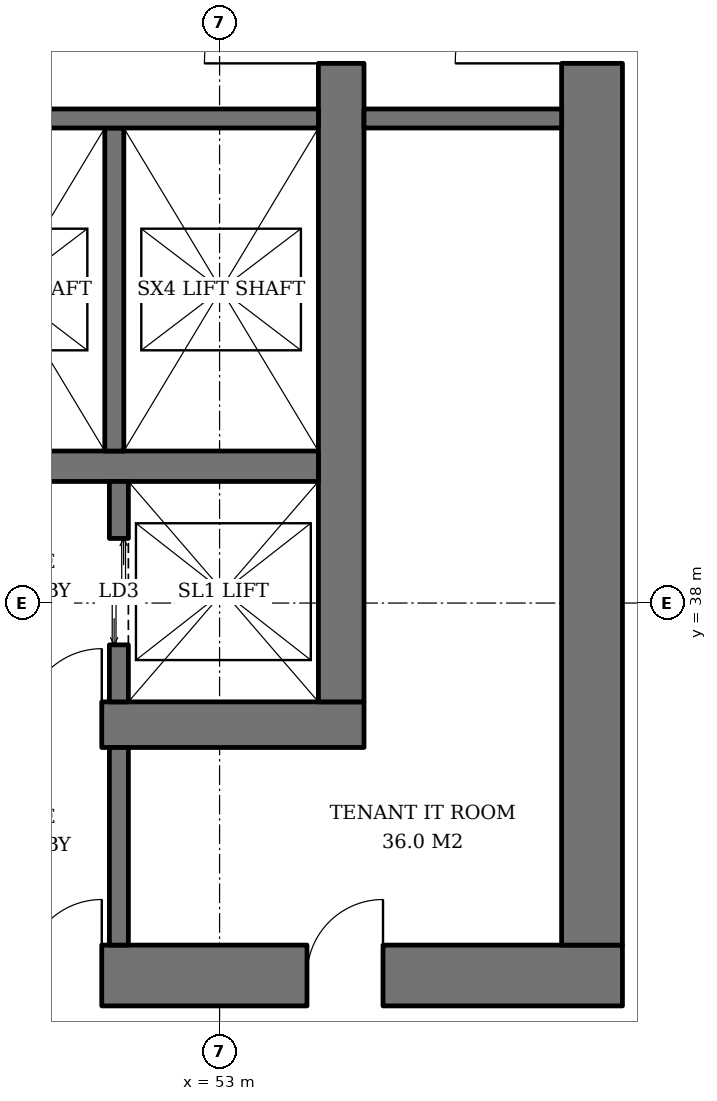
"""IFC4 building model, lengths in metres.
Left out: names, types, materials, properties, quantities, classifications, styles, units other than length and angle.
Written with IfcOpenShell. Run it as: python <this file> out.ifc"""

import sys

from ifc_helpers import new_model, si_unit, direction, frame, frame_2d, origin, place, context, subcontext, project, spatial, rectangle, extrude, element, fill, save


model = new_model("IFC4")
c1 = context("Model", 3, precision=1e-05, world=origin(), true_north=direction((0.0, 1.0)))
c2 = subcontext(c1, "Body", "Model", "MODEL_VIEW")
j1 = project(units=[si_unit("LENGTHUNIT", "METRE"), si_unit("PLANEANGLEUNIT", "RADIAN")], contexts=[c1])
p1 = place(None, origin())
s1 = spatial("IfcSite", under=j1, at=p1, CompositionType="ELEMENT")
p2 = place(p1, origin())
s2 = spatial("IfcBuilding", under=s1, at=p2, CompositionType="ELEMENT")
p3 = place(p2, frame((0.0, 0.0, 28.6)))
s3 = spatial("IfcBuildingStorey", under=s2, at=p3, CompositionType="ELEMENT", Elevation=28.6)
p4 = place(p3, frame((35.1, 36.4, 0.0), z_axis=(0.0, 0.0, 1.0), x_axis=(1.0, 0.0, 0.0)))
e1 = element("IfcWall", 1, at=p4, inside=s3, PredefinedType="SHEAR", context=c2, shape_type="SweptSolid", body=[
    extrude(rectangle(XDim=19.8, YDim=0.6, at=frame_2d((9.9, 0.0))), origin(), (0.0, 0.0, 1.0), 3.8),
])
p5 = place(p4, frame((3.9, 0.0, 0.0)))
e2 = element("IfcOpeningElement", 2, at=p5, cuts=e1, PredefinedType="OPENING", context=c2, shape_type="SweptSolid", body=[
    extrude(rectangle(XDim=1.0, YDim=2.1, at=frame_2d((0.5, 1.05))), frame((0.0, 0.31, 0.0), z_axis=(0.0, -1.0, 0.0), x_axis=(1.0, 0.0, 0.0)), (0.0, 0.0, 1.0), 0.62),
])
p6 = place(p4, frame((15.35, 0.0, 0.0)))
e3 = element("IfcOpeningElement", 3, at=p6, cuts=e1, PredefinedType="OPENING", context=c2, shape_type="SweptSolid", body=[
    extrude(rectangle(XDim=1.0, YDim=2.1, at=frame_2d((0.5, 1.05))), frame((0.0, 0.31, 0.0), z_axis=(0.0, -1.0, 0.0), x_axis=(1.0, 0.0, 0.0)), (0.0, 0.0, 1.0), 0.62),
])
p7 = place(p3, frame((54.6, 36.7, 0.0), z_axis=(0.0, 0.0, 1.0), x_axis=(0.0, 1.0, 0.0)))
e4 = element("IfcWall", 4, at=p7, inside=s3, PredefinedType="SHEAR", context=c2, shape_type="SweptSolid", body=[
    extrude(rectangle(XDim=18.6, YDim=0.6, at=frame_2d((9.3, 0.0))), origin(), (0.0, 0.0, 1.0), 3.8),
])
p8 = place(p7, frame((8.4, 0.0, 0.0)))
e5 = element("IfcOpeningElement", 5, at=p8, cuts=e4, PredefinedType="OPENING", context=c2, shape_type="SweptSolid", body=[
    extrude(rectangle(XDim=1.8, YDim=2.4, at=frame_2d((0.9, 1.2))), frame((0.0, 0.31, 0.0), z_axis=(0.0, -1.0, 0.0), x_axis=(1.0, 0.0, 0.0)), (0.0, 0.0, 1.0), 0.62),
])
p9 = place(p3, frame((31.7, 33.1, 0.0), z_axis=(0.0, 0.0, 1.0), x_axis=(1.0, 0.0, 0.0)))
e6 = element("IfcWall", 6, at=p9, inside=s3, PredefinedType="SHEAR", context=c2, shape_type="SweptSolid", body=[
    extrude(rectangle(XDim=26.6, YDim=0.8, at=frame_2d((13.3, 0.0))), origin(), (0.0, 0.0, 1.0), 3.8),
])
p10 = place(p9, frame((7.3, 0.0, 0.0)))
e7 = element("IfcOpeningElement", 7, at=p10, cuts=e6, PredefinedType="OPENING", context=c2, shape_type="SweptSolid", body=[
    extrude(rectangle(XDim=1.0, YDim=2.1, at=frame_2d((0.5, 1.05))), frame((0.0, 0.41, 0.0), z_axis=(0.0, -1.0, 0.0), x_axis=(1.0, 0.0, 0.0)), (0.0, 0.0, 1.0), 0.82),
])
p11 = place(p9, frame((18.75, 0.0, 0.0)))
e8 = element("IfcOpeningElement", 8, at=p11, cuts=e6, PredefinedType="OPENING", context=c2, shape_type="SweptSolid", body=[
    extrude(rectangle(XDim=1.0, YDim=2.1, at=frame_2d((0.5, 1.05))), frame((0.0, 0.41, 0.0), z_axis=(0.0, -1.0, 0.0), x_axis=(1.0, 0.0, 0.0)), (0.0, 0.0, 1.0), 0.82),
])
p12 = place(p9, frame((3.25, 0.0, 0.0)))
e9 = element("IfcOpeningElement", 9, at=p12, cuts=e6, PredefinedType="OPENING", context=c2, shape_type="SweptSolid", body=[
    extrude(rectangle(XDim=1.0, YDim=2.1, at=frame_2d((0.5, 1.05))), frame((0.0, 0.41, 0.0), z_axis=(0.0, -1.0, 0.0), x_axis=(1.0, 0.0, 0.0)), (0.0, 0.0, 1.0), 0.82),
])
p13 = place(p9, frame((10.42, 0.0, 0.0)))
e10 = element("IfcOpeningElement", 10, at=p13, cuts=e6, PredefinedType="OPENING", context=c2, shape_type="SweptSolid", body=[
    extrude(rectangle(XDim=1.0, YDim=2.1, at=frame_2d((0.5, 1.05))), frame((0.0, 0.41, 0.0), z_axis=(0.0, -1.0, 0.0), x_axis=(1.0, 0.0, 0.0)), (0.0, 0.0, 1.0), 0.82),
])
p14 = place(p9, frame((14.46, 0.0, 0.0)))
e11 = element("IfcOpeningElement", 11, at=p14, cuts=e6, PredefinedType="OPENING", context=c2, shape_type="SweptSolid", body=[
    extrude(rectangle(XDim=1.0, YDim=2.1, at=frame_2d((0.5, 1.05))), frame((0.0, 0.41, 0.0), z_axis=(0.0, -1.0, 0.0), x_axis=(1.0, 0.0, 0.0)), (0.0, 0.0, 1.0), 0.82),
])
p15 = place(p9, frame((22.45, 0.0, 0.0)))
e12 = element("IfcOpeningElement", 12, at=p15, cuts=e6, PredefinedType="OPENING", context=c2, shape_type="SweptSolid", body=[
    extrude(rectangle(XDim=1.0, YDim=2.1, at=frame_2d((0.5, 1.05))), frame((0.0, 0.41, 0.0), z_axis=(0.0, -1.0, 0.0), x_axis=(1.0, 0.0, 0.0)), (0.0, 0.0, 1.0), 0.82),
])
p16 = place(p3, frame((57.9, 33.5, 0.0), z_axis=(0.0, 0.0, 1.0), x_axis=(0.0, 1.0, 0.0)))
e13 = element("IfcWall", 13, at=p16, inside=s3, PredefinedType="SHEAR", context=c2, shape_type="SweptSolid", body=[
    extrude(rectangle(XDim=25.0, YDim=0.8, at=frame_2d((12.5, 0.0))), origin(), (0.0, 0.0, 1.0), 3.8),
])
p17 = place(p16, frame((11.6, 0.0, 0.0)))
e14 = element("IfcOpeningElement", 14, at=p17, cuts=e13, PredefinedType="OPENING", context=c2, shape_type="SweptSolid", body=[
    extrude(rectangle(XDim=1.8, YDim=2.4, at=frame_2d((0.9, 1.2))), frame((0.0, 0.41, 0.0), z_axis=(0.0, -1.0, 0.0), x_axis=(1.0, 0.0, 0.0)), (0.0, 0.0, 1.0), 0.82),
])
p18 = place(p3, frame((35.7, 39.8, 0.0), z_axis=(0.0, 0.0, 1.0), x_axis=(1.0, 0.0, 0.0)))
e15 = element("IfcWall", 15, at=p18, inside=s3, PredefinedType="SHEAR", context=c2, shape_type="SweptSolid", body=[
    extrude(rectangle(XDim=18.6, YDim=0.4, at=frame_2d((9.3, 0.0))), origin(), (0.0, 0.0, 1.0), 3.8),
])
p19 = place(p3, frame((51.675, 36.7, 0.0), z_axis=(0.0, 0.0, 1.0), x_axis=(0.0, 1.0, 0.0)))
e16 = element("IfcWall", 16, at=p19, inside=s3, PredefinedType="SHEAR", context=c2, shape_type="SweptSolid", body=[
    extrude(rectangle(XDim=2.9, YDim=0.25, at=frame_2d((1.45, 0.0))), origin(), (0.0, 0.0, 1.0), 3.8),
])
p20 = place(p19, frame((0.75, 0.0, 0.0)))
e17 = element("IfcOpeningElement", 17, at=p20, cuts=e16, PredefinedType="OPENING", context=c2, shape_type="SweptSolid", body=[
    extrude(rectangle(XDim=1.4, YDim=2.4, at=frame_2d((0.7, 1.2))), frame((0.0, 0.135, 0.0), z_axis=(0.0, -1.0, 0.0), x_axis=(1.0, 0.0, 0.0)), (0.0, 0.0, 1.0), 0.27),
])
p21 = place(p3, frame((51.615, 44.25, 0.0), z_axis=(0.0, 0.0, 1.0), x_axis=(0.0, -1.0, 0.0)))
e18 = element("IfcWall", 18, at=p21, inside=s3, PredefinedType="SHEAR", context=c2, shape_type="SweptSolid", body=[
    extrude(rectangle(XDim=4.25, YDim=0.25, at=frame_2d((2.125, 0.0))), origin(), (0.0, 0.0, 1.0), 3.8),
])
p22 = place(p3, frame((48.93, 44.375, 0.0), z_axis=(0.0, 0.0, 1.0), x_axis=(1.0, 0.0, 0.0)))
e19 = element("IfcWall", 19, at=p22, inside=s3, PredefinedType="SHEAR", context=c2, shape_type="SweptSolid", body=[
    extrude(rectangle(XDim=5.37, YDim=0.25, at=frame_2d((2.685, 0.0))), origin(), (0.0, 0.0, 1.0), 3.8),
])
for number, where, z_axis, x_axis in (
    (20, (54.9, 44.375, 0.0), (0.0, 0.0, 1.0), (1.0, 0.0, 0.0)),
    (21, (51.675, 33.5, 0.0), (0.0, 0.0, 1.0), (0.0, 1.0, 0.0)),
):
    element("IfcWall", number, at=place(p3, frame(where, z_axis=z_axis, x_axis=x_axis)), inside=s3, PredefinedType="SOLIDWALL", context=c2, shape_type="SweptSolid", body=[
        extrude(rectangle(XDim=2.6, YDim=0.25, at=frame_2d((1.3, 0.0))), origin(), (0.0, 0.0, 1.0), 3.62),
    ])
p23 = place(p20, origin())
e22 = element("IfcDoor", 22, at=p23, inside=s3, OperationType="DOUBLE_DOOR_SLIDING", PredefinedType="DOOR", context=c2, shape_type="SweptSolid", body=[
    extrude(rectangle(XDim=1.4, YDim=2.4, at=frame_2d((0.7, 1.2))), frame((0.0, 0.025, 0.0), z_axis=(0.0, -1.0, 0.0), x_axis=(1.0, 0.0, 0.0)), (0.0, 0.0, 1.0), 0.05),
])
fill(e17, e22)
p24 = place(p8, origin())
e23 = element("IfcDoor", 23, at=p24, inside=s3, OperationType="DOUBLE_DOOR_SINGLE_SWING", PredefinedType="DOOR", context=c2, shape_type="SweptSolid", body=[
    extrude(rectangle(XDim=1.8, YDim=2.4, at=frame_2d((0.9, 1.2))), frame((0.0, 0.025, 0.0), z_axis=(0.0, -1.0, 0.0), x_axis=(1.0, 0.0, 0.0)), (0.0, 0.0, 1.0), 0.05),
])
fill(e5, e23)
p25 = place(p6, origin())
e24 = element("IfcDoor", 24, at=p25, inside=s3, OperationType="SINGLE_SWING_RIGHT", PredefinedType="DOOR", context=c2, shape_type="SweptSolid", body=[
    extrude(rectangle(XDim=1.0, YDim=2.1, at=frame_2d((0.5, 1.05))), frame((0.0, 0.025, 0.0), z_axis=(0.0, -1.0, 0.0), x_axis=(1.0, 0.0, 0.0)), (0.0, 0.0, 1.0), 0.05),
])
fill(e3, e24)
p26 = place(p17, origin())
e25 = element("IfcDoor", 25, at=p26, inside=s3, OperationType="DOUBLE_DOOR_SINGLE_SWING", PredefinedType="DOOR", context=c2, shape_type="SweptSolid", body=[
    extrude(rectangle(XDim=1.8, YDim=2.4, at=frame_2d((0.9, 1.2))), frame((0.0, 0.025, 0.0), z_axis=(0.0, -1.0, 0.0), x_axis=(1.0, 0.0, 0.0)), (0.0, 0.0, 1.0), 0.05),
])
fill(e14, e25)
p27 = place(p11, origin())
e26 = element("IfcDoor", 26, at=p27, inside=s3, OperationType="SINGLE_SWING_RIGHT", PredefinedType="DOOR", context=c2, shape_type="SweptSolid", body=[
    extrude(rectangle(XDim=1.0, YDim=2.1, at=frame_2d((0.5, 1.05))), frame((0.0, 0.025, 0.0), z_axis=(0.0, -1.0, 0.0), x_axis=(1.0, 0.0, 0.0)), (0.0, 0.0, 1.0), 0.05),
])
fill(e8, e26)
p28 = place(p15, origin())
e27 = element("IfcDoor", 27, at=p28, inside=s3, OperationType="SINGLE_SWING_RIGHT", PredefinedType="DOOR", context=c2, shape_type="SweptSolid", body=[
    extrude(rectangle(XDim=1.0, YDim=2.1, at=frame_2d((0.5, 1.05))), frame((0.0, 0.39, 0.0), z_axis=(0.0, -1.0, 0.0), x_axis=(1.0, 0.0, 0.0)), (0.0, 0.0, 1.0), 0.05),
])
fill(e12, e27)
save(model, sys.argv[1])
